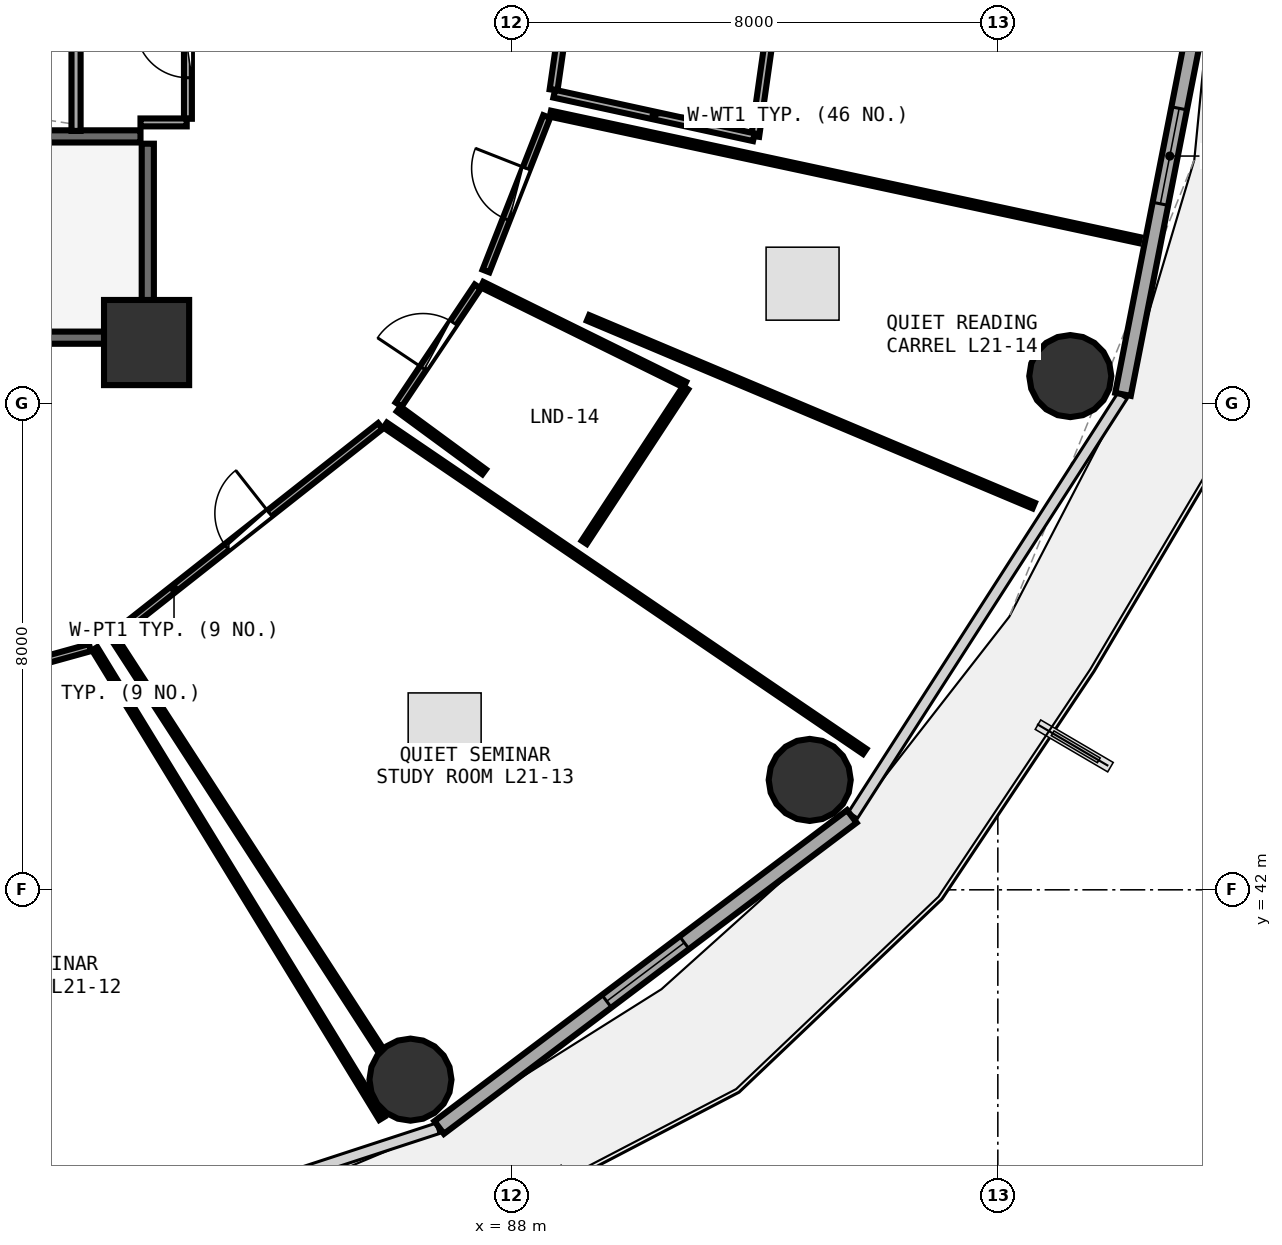
"""IFC4 building model, lengths in metres.
Left out: names, types, materials, properties, quantities, classifications, styles, units other than length and angle.
Written with IfcOpenShell. Run it as: python <this file> out.ifc"""

import sys

from ifc_helpers import new_model, si_unit, direction, frame, frame_2d, origin, origin_2d, place, context, subcontext, project, spatial, rectangle, circle, extrude, element, fill, save


model = new_model("IFC4")
c1 = context("Model", 3, precision=1e-05, world=origin(), true_north=direction((0.0, 1.0)))
c2 = subcontext(c1, "Body", "Model", "MODEL_VIEW")
j1 = project(units=[si_unit("LENGTHUNIT", "METRE"), si_unit("PLANEANGLEUNIT", "RADIAN")], contexts=[c1])
p1 = place(None, origin())
s1 = spatial("IfcSite", under=j1, at=p1, CompositionType="ELEMENT")
p2 = place(p1, origin())
s2 = spatial("IfcBuilding", under=s1, at=p2, CompositionType="ELEMENT")
p3 = place(p2, frame((0.0, 0.0, 83.85)))
s3 = spatial("IfcBuildingStorey", under=s2, at=p3, CompositionType="ELEMENT", Elevation=83.85)
p4 = place(p3, frame((82.0, 51.0, 0.0), z_axis=(0.0, 0.0, 1.0), x_axis=(1.0, 0.0, 0.0)))
e1 = element("IfcColumn", 1, at=p4, inside=s3, PredefinedType="PILASTER", context=c2, shape_type="SweptSolid", body=[
    extrude(rectangle(XDim=1.4, YDim=1.4, at=origin_2d()), origin(), (0.0, 0.0, 1.0), 3.75),
])
for number, where, z_axis, x_axis in (
    (2, (86.34, 38.878, 0.0), (0.0, 0.0, 1.0), (1.0, 0.0, 0.0)),
    (3, (92.906, 43.807, 0.0), (0.0, 0.0, 1.0), (1.0, 0.0, 0.0)),
    (4, (97.192, 50.448, 0.0), (0.0, 0.0, 1.0), (1.0, 0.0, 0.0)),
):
    element("IfcColumn", number, at=place(p3, frame(where, z_axis=z_axis, x_axis=x_axis)), inside=s3, PredefinedType="COLUMN", context=c2, shape_type="SweptSolid", body=[
        extrude(circle(Radius=0.675, at=origin_2d()), origin(), (0.0, 0.0, 1.0), 3.75),
    ])
p5 = place(p3, frame((86.812, 38.09, 0.0), z_axis=(0.0, 0.0, 1.0), x_axis=(0.798501507879, 0.601992808857, 0.0)))
e5 = element("IfcWall", 5, at=p5, inside=s3, PredefinedType="SOLIDWALL", context=c2, shape_type="SweptSolid", body=[
    extrude(rectangle(XDim=8.499, YDim=0.26, at=frame_2d((4.25, 0.0))), origin(), (0.0, 0.0, 1.0), 3.475),
])
p6 = place(p5, frame((3.45, 0.0, 0.85)))
e6 = element("IfcOpeningElement", 6, at=p6, cuts=e5, PredefinedType="OPENING", context=c2, shape_type="SweptSolid", body=[
    extrude(rectangle(XDim=1.6, YDim=1.45, at=frame_2d((0.8, 0.725))), frame((0.0, 0.14, 0.0), z_axis=(0.0, -1.0, 0.0), x_axis=(1.0, 0.0, 0.0)), (0.0, 0.0, 1.0), 0.28),
])
p7 = place(p3, frame((98.059, 50.148, 0.0), z_axis=(0.0, 0.0, 1.0), x_axis=(0.192581843632, 0.981280914674, 0.0)))
e7 = element("IfcWall", 7, at=p7, inside=s3, PredefinedType="SOLIDWALL", context=c2, shape_type="SweptSolid", body=[
    extrude(rectangle(XDim=7.987, YDim=0.26, at=frame_2d((3.993, 0.0))), origin(), (0.0, 0.0, 1.0), 3.475),
])
p8 = place(p7, frame((3.193, 0.0, 0.85)))
e8 = element("IfcOpeningElement", 8, at=p8, cuts=e7, PredefinedType="OPENING", context=c2, shape_type="SweptSolid", body=[
    extrude(rectangle(XDim=1.6, YDim=1.45, at=frame_2d((0.8, 0.725))), frame((0.0, 0.14, 0.0), z_axis=(0.0, -1.0, 0.0), x_axis=(1.0, 0.0, 0.0)), (0.0, 0.0, 1.0), 0.28),
])
p9 = place(p3, frame((74.0, 51.08, 0.0), z_axis=(0.0, 0.0, 1.0), x_axis=(1.0, 0.0, 0.0)))
e9 = element("IfcWall", 9, at=p9, inside=s3, PredefinedType="SHEAR", context=c2, shape_type="SweptSolid", body=[
    extrude(rectangle(XDim=7.9, YDim=0.2, at=frame_2d((3.95, 0.0))), origin(), (0.0, 0.0, 1.0), 3.49),
])
p10 = place(p9, frame((1.12, 0.0, 0.0)))
e10 = element("IfcOpeningElement", 10, at=p10, cuts=e9, PredefinedType="OPENING", context=c2, shape_type="SweptSolid", body=[
    extrude(rectangle(XDim=1.05, YDim=2.1, at=frame_2d((0.525, 1.05))), frame((0.0, 0.11, 0.0), z_axis=(0.0, -1.0, 0.0), x_axis=(1.0, 0.0, 0.0)), (0.0, 0.0, 1.0), 0.22),
])
p11 = place(p3, frame((82.02, 51.2, 0.0), z_axis=(0.0, 0.0, 1.0), x_axis=(0.0, 1.0, 0.0)))
e11 = element("IfcWall", 11, at=p11, inside=s3, PredefinedType="SHEAR", context=c2, shape_type="SweptSolid", body=[
    extrude(rectangle(XDim=3.07, YDim=0.2, at=frame_2d((1.535, 0.0))), origin(), (0.0, 0.0, 1.0), 3.49),
])
p12 = place(p3, frame((81.9, 54.39, 0.0), z_axis=(0.0, 0.0, 1.0), x_axis=(-1.0, 0.0, 0.0)))
e12 = element("IfcWall", 12, at=p12, inside=s3, PredefinedType="SHEAR", context=c2, shape_type="SweptSolid", body=[
    extrude(rectangle(XDim=8.46, YDim=0.2, at=frame_2d((4.23, 0.0))), origin(), (0.0, 0.0, 1.0), 3.49),
])
p13 = place(p3, frame((80.84, 54.48, 0.0), z_axis=(0.0, 0.0, 1.0), x_axis=(0.0, 1.0, 0.0)))
e13 = element("IfcWall", 13, at=p13, inside=s3, PredefinedType="PARTITIONING", context=c2, shape_type="SweptSolid", body=[
    extrude(rectangle(XDim=2.29, YDim=0.15, at=frame_2d((1.145, 0.0))), origin(), (0.0, 0.0, 1.0), 3.48),
])
p14 = place(p3, frame((82.68, 54.68, 0.0), z_axis=(0.0, 0.0, 1.0), x_axis=(0.0, 1.0, 0.0)))
e14 = element("IfcWall", 14, at=p14, inside=s3, PredefinedType="PLUMBINGWALL", context=c2, shape_type="SweptSolid", body=[
    extrude(rectangle(XDim=2.21, YDim=0.13, at=frame_2d((1.105, 0.0))), origin(), (0.0, 0.0, 1.0), 3.48),
])
p15 = place(p14, frame((0.675, 0.0, 0.0)))
e15 = element("IfcOpeningElement", 15, at=p15, cuts=e14, PredefinedType="OPENING", context=c2, shape_type="SweptSolid", body=[
    extrude(rectangle(XDim=0.86, YDim=2.05, at=frame_2d((0.43, 1.025))), frame((0.0, 0.075, 0.0), z_axis=(0.0, -1.0, 0.0), x_axis=(1.0, 0.0, 0.0)), (0.0, 0.0, 1.0), 0.15),
])
p16 = place(p3, frame((75.551, 44.453, 0.0), z_axis=(0.0, 0.0, 1.0), x_axis=(0.963633279283, 0.267228185374, 0.0)))
e16 = element("IfcWall", 16, at=p16, inside=s3, PredefinedType="PARTITIONING", context=c2, shape_type="SweptSolid", body=[
    extrude(rectangle(XDim=5.726, YDim=0.12, at=frame_2d((2.863, 0.0))), origin(), (0.0, 0.0, 1.0), 2.925),
])
p17 = place(p16, frame((2.413, 0.0, 0.0)))
e17 = element("IfcOpeningElement", 17, at=p17, cuts=e16, PredefinedType="OPENING", context=c2, shape_type="SweptSolid", body=[
    extrude(rectangle(XDim=0.9, YDim=2.08, at=frame_2d((0.45, 1.04))), frame((0.0, 0.07, 0.0), z_axis=(0.0, -1.0, 0.0), x_axis=(1.0, 0.0, 0.0)), (0.0, 0.0, 1.0), 0.14),
])
p18 = place(p3, frame((81.494, 46.198, 0.0), z_axis=(0.0, 0.0, 1.0), x_axis=(0.785315722545, 0.619095482074, 0.0)))
e18 = element("IfcWall", 18, at=p18, inside=s3, PredefinedType="PARTITIONING", context=c2, shape_type="SweptSolid", body=[
    extrude(rectangle(XDim=5.54, YDim=0.12, at=frame_2d((2.77, 0.0))), origin(), (0.0, 0.0, 1.0), 2.925),
])
p19 = place(p18, frame((2.32, 0.0, 0.0)))
e19 = element("IfcOpeningElement", 19, at=p19, cuts=e18, PredefinedType="OPENING", context=c2, shape_type="SweptSolid", body=[
    extrude(rectangle(XDim=0.9, YDim=2.08, at=frame_2d((0.45, 1.04))), frame((0.0, 0.07, 0.0), z_axis=(0.0, -1.0, 0.0), x_axis=(1.0, 0.0, 0.0)), (0.0, 0.0, 1.0), 0.14),
])
p20 = place(p3, frame((86.146, 49.981, 0.0), z_axis=(0.0, 0.0, 1.0), x_axis=(0.556604342457, 0.83077771152, 0.0)))
e20 = element("IfcWall", 20, at=p20, inside=s3, PredefinedType="PARTITIONING", context=c2, shape_type="SweptSolid", body=[
    extrude(rectangle(XDim=2.336, YDim=0.12, at=frame_2d((1.168, 0.0))), origin(), (0.0, 0.0, 1.0), 2.925),
])
p21 = place(p20, frame((0.718, 0.0, 0.0)))
e21 = element("IfcOpeningElement", 21, at=p21, cuts=e20, PredefinedType="OPENING", context=c2, shape_type="SweptSolid", body=[
    extrude(rectangle(XDim=0.9, YDim=2.08, at=frame_2d((0.45, 1.04))), frame((0.0, 0.07, 0.0), z_axis=(0.0, -1.0, 0.0), x_axis=(1.0, 0.0, 0.0)), (0.0, 0.0, 1.0), 0.14),
])
p22 = place(p3, frame((87.582, 52.177, 0.0), z_axis=(0.0, 0.0, 1.0), x_axis=(0.365846135531, 0.930675348936, 0.0)))
e22 = element("IfcWall", 22, at=p22, inside=s3, PredefinedType="PARTITIONING", context=c2, shape_type="SweptSolid", body=[
    extrude(rectangle(XDim=2.729, YDim=0.12, at=frame_2d((1.364, 0.0))), origin(), (0.0, 0.0, 1.0), 3.235),
])
p23 = place(p22, frame((0.914, 0.0, 0.0)))
e23 = element("IfcOpeningElement", 23, at=p23, cuts=e22, PredefinedType="OPENING", context=c2, shape_type="SweptSolid", body=[
    extrude(rectangle(XDim=0.9, YDim=2.08, at=frame_2d((0.45, 1.04))), frame((0.0, 0.07, 0.0), z_axis=(0.0, -1.0, 0.0), x_axis=(1.0, 0.0, 0.0)), (0.0, 0.0, 1.0), 0.14),
])
p24 = place(p3, frame((88.694, 55.156, 0.0), z_axis=(0.0, 0.0, 1.0), x_axis=(0.14330641518, 0.989678367637, 0.0)))
e24 = element("IfcWall", 24, at=p24, inside=s3, PredefinedType="PLUMBINGWALL", context=c2, shape_type="SweptSolid", body=[
    extrude(rectangle(XDim=2.176, YDim=0.13, at=frame_2d((1.088, 0.0))), origin(), (0.0, 0.0, 1.0), 3.48),
])
p25 = place(p24, frame((0.658, 0.0, 0.0)))
e25 = element("IfcOpeningElement", 25, at=p25, cuts=e24, PredefinedType="OPENING", context=c2, shape_type="SweptSolid", body=[
    extrude(rectangle(XDim=0.86, YDim=2.05, at=frame_2d((0.43, 1.025))), frame((0.0, 0.075, 0.0), z_axis=(0.0, -1.0, 0.0), x_axis=(1.0, 0.0, 0.0)), (0.0, 0.0, 1.0), 0.15),
])
p26 = place(p3, frame((81.9, 54.62, 0.0), z_axis=(0.0, 0.0, 1.0), x_axis=(1.0, 0.0, 0.0)))
e26 = element("IfcWall", 26, at=p26, inside=s3, PredefinedType="PLUMBINGWALL", context=c2, shape_type="SweptSolid", body=[
    extrude(rectangle(XDim=0.76, YDim=0.13, at=frame_2d((0.38, 0.0))), origin(), (0.0, 0.0, 1.0), 2.775),
])
p27 = place(p3, frame((81.147, 45.965, 0.0), z_axis=(0.0, 0.0, 1.0), x_axis=(0.521624536189, -0.853175153908, 0.0)))
e27 = element("IfcWall", 27, at=p27, inside=s3, PredefinedType="PARTITIONING", context=c2, shape_type="SweptSolid", body=[
    extrude(rectangle(XDim=9.053, YDim=0.1, at=frame_2d((4.526, 0.0))), origin(), (0.0, 0.0, 1.0), 2.975),
])
p28 = place(p3, frame((85.925, 49.643, 0.0), z_axis=(0.0, 0.0, 1.0), x_axis=(0.826688408753, -0.562659999319, 0.0)))
e28 = element("IfcWall", 28, at=p28, inside=s3, PredefinedType="PARTITIONING", context=c2, shape_type="SweptSolid", body=[
    extrude(rectangle(XDim=9.539, YDim=0.1, at=frame_2d((4.77, 0.0))), origin(), (0.0, 0.0, 1.0), 2.975),
])
p29 = place(p3, frame((85.844, 39.372, 0.0), z_axis=(0.0, 0.0, 1.0), x_axis=(-0.543590830013, 0.839350349691, 0.0)))
e29 = element("IfcWall", 29, at=p29, inside=s3, PredefinedType="PARTITIONING", context=c2, shape_type="SweptSolid", body=[
    extrude(rectangle(XDim=8.048, YDim=0.1, at=frame_2d((4.024, 0.0))), origin(), (0.0, 0.0, 1.0), 3.175),
])
p30 = place(p3, frame((87.516, 51.953, 0.0), z_axis=(0.0, 0.0, 1.0), x_axis=(0.896816300292, -0.442403123328, 0.0)))
e30 = element("IfcWall", 30, at=p30, inside=s3, PredefinedType="PARTITIONING", context=c2, shape_type="SweptSolid", body=[
    extrude(rectangle(XDim=3.72, YDim=0.1, at=frame_2d((1.86, 0.0))), origin(), (0.0, 0.0, 1.0), 2.925),
])
p31 = place(p3, frame((90.866, 50.257, 0.0), z_axis=(0.0, 0.0, 1.0), x_axis=(-0.548626626693, -0.836067476035, 0.0)))
e31 = element("IfcWall", 31, at=p31, inside=s3, PredefinedType="PARTITIONING", context=c2, shape_type="SweptSolid", body=[
    extrude(rectangle(XDim=3.041, YDim=0.1, at=frame_2d((1.521, 0.0))), origin(), (0.0, 0.0, 1.0), 3.175),
])
p32 = place(p3, frame((87.552, 48.874, 0.0), z_axis=(0.0, 0.0, 1.0), x_axis=(-0.805902241708, 0.592048627065, 0.0)))
e32 = element("IfcWall", 32, at=p32, inside=s3, PredefinedType="PARTITIONING", context=c2, shape_type="SweptSolid", body=[
    extrude(rectangle(XDim=1.746, YDim=0.1, at=frame_2d((0.873, 0.0))), origin(), (0.0, 0.0, 1.0), 3.235),
])
p33 = place(p3, frame((88.641, 54.764, 0.0), z_axis=(0.0, 0.0, 1.0), x_axis=(0.97772336182, -0.209897660187, 0.0)))
e33 = element("IfcWall", 33, at=p33, inside=s3, PredefinedType="PARTITIONING", context=c2, shape_type="SweptSolid", body=[
    extrude(rectangle(XDim=9.906, YDim=0.1, at=frame_2d((4.953, 0.0))), origin(), (0.0, 0.0, 1.0), 2.975),
])
p34 = place(p3, frame((96.59, 48.319, 0.0), z_axis=(0.0, 0.0, 1.0), x_axis=(-0.92163364156, 0.388061117279, 0.0)))
e34 = element("IfcWall", 34, at=p34, inside=s3, PredefinedType="PARTITIONING", context=c2, shape_type="SweptSolid", body=[
    extrude(rectangle(XDim=7.953, YDim=0.1, at=frame_2d((3.977, 0.0))), origin(), (0.0, 0.0, 1.0), 2.925),
])
p35 = place(p3, frame((92.407, 57.191, 0.0), z_axis=(0.0, 0.0, 1.0), x_axis=(-0.140575090878, -0.990070019658, 0.0)))
e35 = element("IfcWall", 35, at=p35, inside=s3, PredefinedType="PLUMBINGWALL", context=c2, shape_type="SweptSolid", body=[
    extrude(rectangle(XDim=2.827, YDim=0.13, at=frame_2d((1.414, 0.0))), origin(), (0.0, 0.0, 1.0), 3.48),
])
p36 = place(p3, frame((91.988, 54.376, 0.0), z_axis=(0.0, 0.0, 1.0), x_axis=(-0.977059488183, 0.212966562048, 0.0)))
e36 = element("IfcWall", 36, at=p36, inside=s3, PredefinedType="PLUMBINGWALL", context=c2, shape_type="SweptSolid", body=[
    extrude(rectangle(XDim=3.36, YDim=0.13, at=frame_2d((1.68, 0.0))), origin(), (0.0, 0.0, 1.0), 3.175),
])
p37 = place(p6, origin())
e37 = element("IfcWindow", 37, at=p37, inside=s3, PartitioningType="SINGLE_PANEL", PredefinedType="WINDOW", context=c2, shape_type="SweptSolid", body=[
    extrude(rectangle(XDim=1.6, YDim=1.45, at=frame_2d((0.8, 0.725))), frame((0.0, 0.03, 0.0), z_axis=(0.0, -1.0, 0.0), x_axis=(1.0, 0.0, 0.0)), (0.0, 0.0, 1.0), 0.06),
])
fill(e6, e37)
p38 = place(p8, origin())
e38 = element("IfcWindow", 38, at=p38, inside=s3, PartitioningType="SINGLE_PANEL", PredefinedType="WINDOW", context=c2, shape_type="SweptSolid", body=[
    extrude(rectangle(XDim=1.6, YDim=1.45, at=frame_2d((0.8, 0.725))), frame((0.0, 0.03, 0.0), z_axis=(0.0, -1.0, 0.0), x_axis=(1.0, 0.0, 0.0)), (0.0, 0.0, 1.0), 0.06),
])
fill(e8, e38)
p39 = place(p15, origin())
e39 = element("IfcDoor", 39, at=p39, inside=s3, OperationType="SINGLE_SWING_RIGHT", PredefinedType="DOOR", context=c2, shape_type="SweptSolid", body=[
    extrude(rectangle(XDim=0.86, YDim=2.05, at=frame_2d((0.43, 1.025))), frame((0.0, 0.025, 0.0), z_axis=(0.0, -1.0, 0.0), x_axis=(1.0, 0.0, 0.0)), (0.0, 0.0, 1.0), 0.05),
])
fill(e15, e39)
p40 = place(p19, origin())
e40 = element("IfcDoor", 40, at=p40, inside=s3, OperationType="SINGLE_SWING_RIGHT", PredefinedType="DOOR", context=c2, shape_type="SweptSolid", body=[
    extrude(rectangle(XDim=0.9, YDim=2.08, at=frame_2d((0.45, 1.04))), frame((0.0, 0.025, 0.0), z_axis=(0.0, -1.0, 0.0), x_axis=(1.0, 0.0, 0.0)), (0.0, 0.0, 1.0), 0.05),
])
fill(e19, e40)
p41 = place(p21, origin())
e41 = element("IfcDoor", 41, at=p41, inside=s3, OperationType="SINGLE_SWING_LEFT", PredefinedType="DOOR", context=c2, shape_type="SweptSolid", body=[
    extrude(rectangle(XDim=0.9, YDim=2.08, at=frame_2d((0.45, 1.04))), frame((0.0, 0.025, 0.0), z_axis=(0.0, -1.0, 0.0), x_axis=(1.0, 0.0, 0.0)), (0.0, 0.0, 1.0), 0.05),
])
fill(e21, e41)
p42 = place(p23, origin())
e42 = element("IfcDoor", 42, at=p42, inside=s3, OperationType="SINGLE_SWING_RIGHT", PredefinedType="DOOR", context=c2, shape_type="SweptSolid", body=[
    extrude(rectangle(XDim=0.9, YDim=2.08, at=frame_2d((0.45, 1.04))), frame((0.0, 0.025, 0.0), z_axis=(0.0, -1.0, 0.0), x_axis=(1.0, 0.0, 0.0)), (0.0, 0.0, 1.0), 0.05),
])
fill(e23, e42)
save(model, sys.argv[1])
